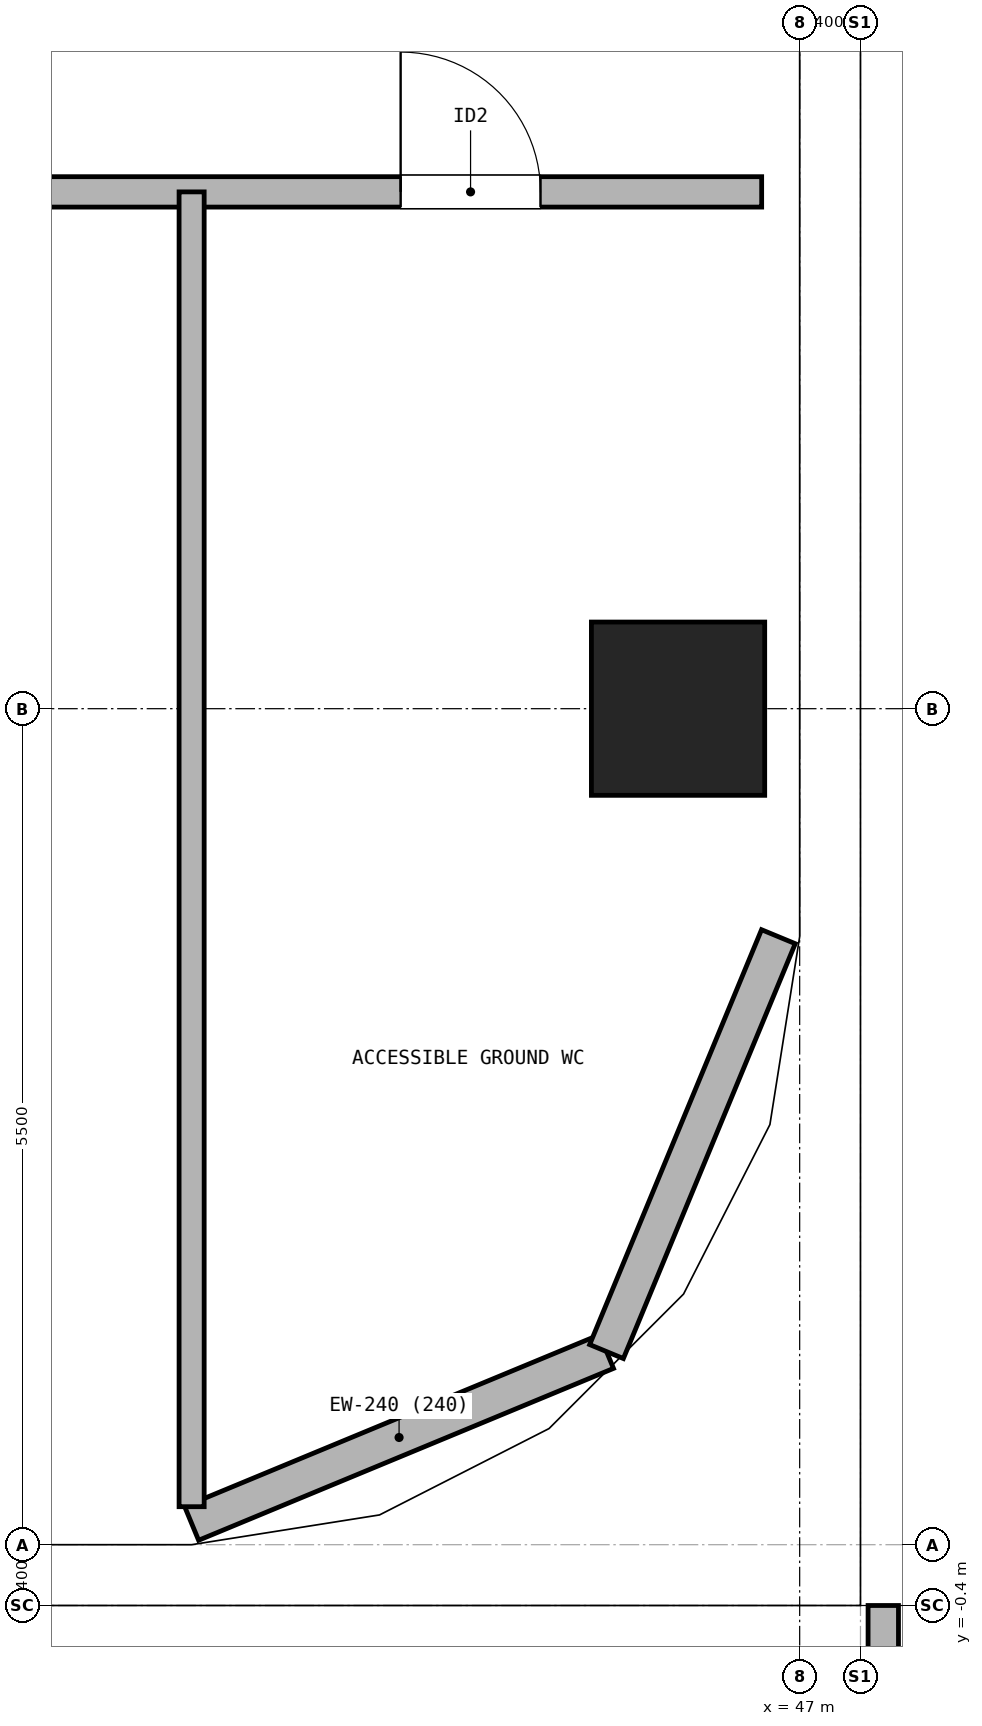
"""IFC4 building model, lengths in metres.
Left out: names, types, materials, properties, quantities, classifications, styles, units other than length and angle.
Written with IfcOpenShell. Run it as: python <this file> out.ifc"""

import sys

from ifc_helpers import new_model, si_unit, direction, frame, frame_2d, origin, origin_2d, place, context, subcontext, project, spatial, rectangle, hollow_rectangle, extrude, source, transform, mapped, element, fill, save


model = new_model("IFC4")
c1 = context("Model", 3, precision=1e-05, world=origin(), true_north=direction((0.0, 1.0)))
c2 = subcontext(c1, "Body", "Model", "MODEL_VIEW")
j1 = project(units=[si_unit("LENGTHUNIT", "METRE"), si_unit("PLANEANGLEUNIT", "RADIAN")], contexts=[c1])
p1 = place(None, origin())
s1 = spatial("IfcSite", under=j1, at=p1, CompositionType="ELEMENT")
p2 = place(p1, origin())
s2 = spatial("IfcBuilding", under=s1, at=p2, CompositionType="ELEMENT")
p3 = place(p2, origin())
s3 = spatial("IfcBuildingStorey", under=s2, at=p3, CompositionType="ELEMENT", Elevation=0.0)
m1 = source(origin(), c2, "Body", "SweptSolid", [
    extrude(hollow_rectangle(XDim=1.14, YDim=1.14, WallThickness=0.07, at=origin_2d()), origin(), (0.0, 0.0, 1.0), 4.18),
])
p4 = place(p3, frame((46.2, 5.5, 0.0), z_axis=(0.0, 0.0, 1.0), x_axis=(1.0, 0.0, 0.0)))
e1 = element("IfcColumn", 1, at=p4, inside=s3, PredefinedType="COLUMN", context=c2, shape_type="MappedRepresentation", body=[
    mapped(m1, transform((0.0, 0.0, 0.0), x_axis=(1.0, 0.0, 0.0), y_axis=(0.0, 1.0, 0.0), z_axis=(0.0, 0.0, 1.0), scale=1.0)),
])
for number, where, z_axis, x_axis in (
    (2, (43.0, 0.14, 0.0), (0.0, 0.0, 1.0), (0.924, 0.383, 0.0)),
    (3, (45.729, 1.271, 0.0), (0.0, 0.0, 1.0), (0.383, 0.924, 0.0)),
):
    element("IfcWall", number, at=place(p3, frame(where, z_axis=z_axis, x_axis=x_axis)), inside=s3, PredefinedType="SOLIDWALL", context=c2, shape_type="SweptSolid", body=[
        extrude(rectangle(XDim=2.954, YDim=0.24, at=frame_2d((1.477, 0.0))), origin(), (0.0, 0.0, 1.0), 4.18),
    ])
p5 = place(p3, frame((0.25, 8.9, 0.0), z_axis=(0.0, 0.0, 1.0), x_axis=(1.0, 0.0, 0.0)))
e4 = element("IfcWall", 4, at=p5, inside=s3, PredefinedType="PARTITIONING", context=c2, shape_type="SweptSolid", body=[
    extrude(rectangle(XDim=46.5, YDim=0.2, at=frame_2d((23.25, 0.0))), origin(), (0.0, 0.0, 1.0), 4.18),
])
p6 = place(p5, frame((10.25, 0.0, 0.0)))
e5 = element("IfcOpeningElement", 5, at=p6, cuts=e4, PredefinedType="OPENING", context=c2, shape_type="SweptSolid", body=[
    extrude(rectangle(XDim=1.0, YDim=2.15, at=frame_2d((0.5, 1.075))), frame((0.0, 0.11, 0.0), z_axis=(0.0, -1.0, 0.0), x_axis=(1.0, 0.0, 0.0)), (0.0, 0.0, 1.0), 0.22),
])
p7 = place(p5, frame((20.25, 0.0, 0.0)))
e6 = element("IfcOpeningElement", 6, at=p7, cuts=e4, PredefinedType="OPENING", context=c2, shape_type="SweptSolid", body=[
    extrude(rectangle(XDim=0.95, YDim=2.15, at=frame_2d((0.475, 1.075))), frame((0.0, 0.11, 0.0), z_axis=(0.0, -1.0, 0.0), x_axis=(1.0, 0.0, 0.0)), (0.0, 0.0, 1.0), 0.22),
])
p8 = place(p5, frame((33.0, 0.0, 0.0)))
e7 = element("IfcOpeningElement", 7, at=p8, cuts=e4, PredefinedType="OPENING", context=c2, shape_type="SweptSolid", body=[
    extrude(rectangle(XDim=0.95, YDim=2.15, at=frame_2d((0.475, 1.075))), frame((0.0, 0.11, 0.0), z_axis=(0.0, -1.0, 0.0), x_axis=(1.0, 0.0, 0.0)), (0.0, 0.0, 1.0), 0.22),
])
p9 = place(p5, frame((40.25, 0.0, 0.0)))
e8 = element("IfcOpeningElement", 8, at=p9, cuts=e4, PredefinedType="OPENING", context=c2, shape_type="SweptSolid", body=[
    extrude(rectangle(XDim=0.92, YDim=2.1, at=frame_2d((0.46, 1.05))), frame((0.0, 0.11, 0.0), z_axis=(0.0, -1.0, 0.0), x_axis=(1.0, 0.0, 0.0)), (0.0, 0.0, 1.0), 0.22),
])
p10 = place(p5, frame((44.125, 0.0, 0.0)))
e9 = element("IfcOpeningElement", 9, at=p10, cuts=e4, PredefinedType="OPENING", context=c2, shape_type="SweptSolid", body=[
    extrude(rectangle(XDim=0.92, YDim=2.1, at=frame_2d((0.46, 1.05))), frame((0.0, 0.11, 0.0), z_axis=(0.0, -1.0, 0.0), x_axis=(1.0, 0.0, 0.0)), (0.0, 0.0, 1.0), 0.22),
])
p11 = place(p3, frame((43.0, 0.25, 0.0), z_axis=(0.0, 0.0, 1.0), x_axis=(0.0, 1.0, 0.0)))
e10 = element("IfcWall", 10, at=p11, inside=s3, PredefinedType="PARTITIONING", context=c2, shape_type="SweptSolid", body=[
    extrude(rectangle(XDim=8.65, YDim=0.165, at=frame_2d((4.325, 0.0))), origin(), (0.0, 0.0, 1.0), 4.18),
])
p12 = place(p3, frame((47.55, -10.95, 0.0), z_axis=(0.0, 0.0, 1.0), x_axis=(0.0, 1.0, 0.0)))
e11 = element("IfcWall", 11, at=p12, inside=s3, PredefinedType="PARTITIONING", context=c2, shape_type="SweptSolid", body=[
    extrude(rectangle(XDim=10.55, YDim=0.2, at=frame_2d((5.275, 0.0))), origin(), (0.0, 0.0, 1.0), 4.18),
])
p13 = place(p12, frame((5.35, 0.0, 0.0)))
e12 = element("IfcOpeningElement", 12, at=p13, cuts=e11, PredefinedType="OPENING", context=c2, shape_type="SweptSolid", body=[
    extrude(rectangle(XDim=1.3, YDim=2.2, at=frame_2d((0.65, 1.1))), frame((0.0, 0.11, 0.0), z_axis=(0.0, -1.0, 0.0), x_axis=(1.0, 0.0, 0.0)), (0.0, 0.0, 1.0), 0.22),
])
p14 = place(p10, frame((0.92, 0.0, 0.0), z_axis=(0.0, 0.0, 1.0), x_axis=(-1.0, 0.0, 0.0)))
e13 = element("IfcDoor", 13, at=p14, inside=s3, OperationType="SINGLE_SWING_LEFT", PredefinedType="DOOR", context=c2, shape_type="SweptSolid", body=[
    extrude(rectangle(XDim=0.92, YDim=2.1, at=frame_2d((0.46, 1.05))), frame((0.0, 0.025, 0.0), z_axis=(0.0, -1.0, 0.0), x_axis=(1.0, 0.0, 0.0)), (0.0, 0.0, 1.0), 0.05),
])
fill(e9, e13)
save(model, sys.argv[1])
